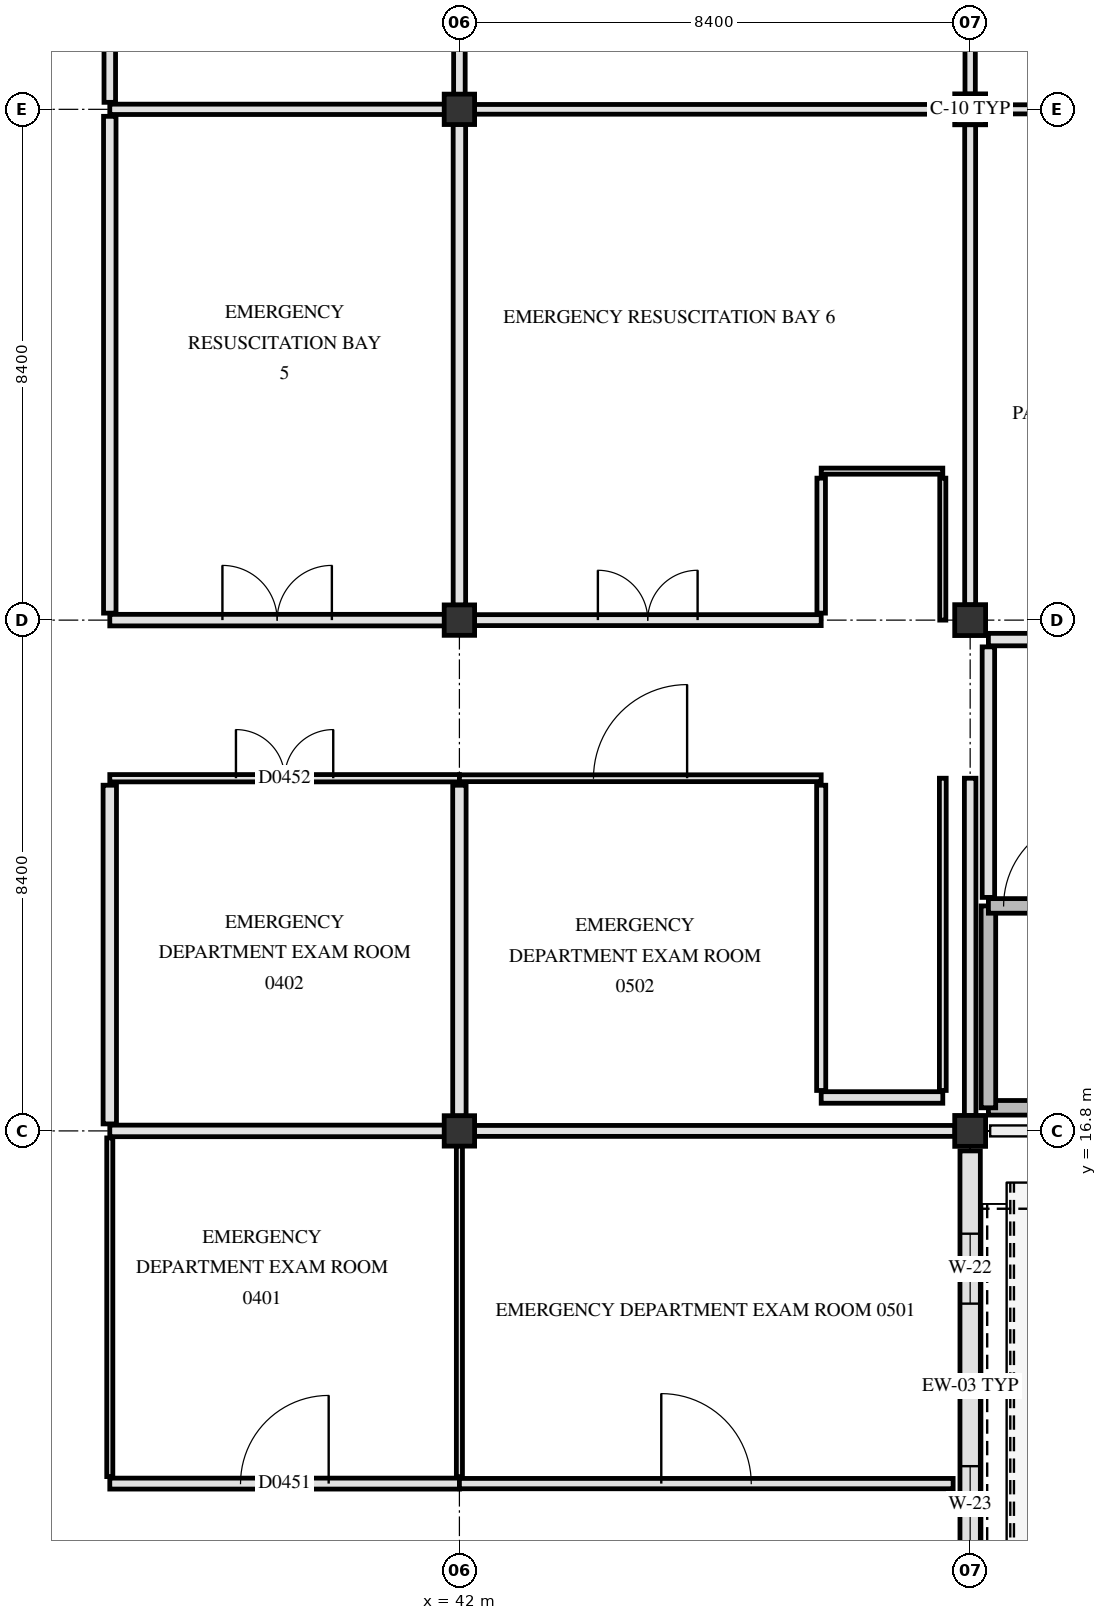
"""IFC4 building model, lengths in metres.
Left out: names, types, materials, properties, quantities, classifications, styles, units other than length and angle.
Written with IfcOpenShell. Run it as: python <this file> out.ifc"""

import sys

from ifc_helpers import new_model, si_unit, direction, frame, frame_2d, origin, origin_2d, place, context, subcontext, project, spatial, rectangle, hollow_circle, extrude, element, fill, save


model = new_model("IFC4")
c1 = context("Model", 3, precision=1e-05, world=origin(), true_north=direction((0.0, 1.0)))
c2 = subcontext(c1, "Body", "Model", "MODEL_VIEW")
j1 = project(units=[si_unit("LENGTHUNIT", "METRE"), si_unit("PLANEANGLEUNIT", "RADIAN")], contexts=[c1])
p1 = place(None, origin())
s1 = spatial("IfcSite", under=j1, at=p1, CompositionType="ELEMENT")
p2 = place(p1, origin())
s2 = spatial("IfcBuilding", under=s1, at=p2, CompositionType="ELEMENT")
p3 = place(p2, origin())
s3 = spatial("IfcBuildingStorey", under=s2, at=p3, CompositionType="ELEMENT", Elevation=0.0)
for number, where, z_axis, x_axis in (
    (1, (42.0, 16.8, 0.0), (0.0, 0.0, 1.0), (1.0, 0.0, 0.0)),
    (2, (42.0, 25.2, 0.0), (0.0, 0.0, 1.0), (1.0, 0.0, 0.0)),
    (3, (42.0, 33.6, 0.0), (0.0, 0.0, 1.0), (1.0, 0.0, 0.0)),
):
    element("IfcColumn", number, at=place(p3, frame(where, z_axis=z_axis, x_axis=x_axis)), inside=s3, PredefinedType="COLUMN", context=c2, shape_type="SweptSolid", body=[
        extrude(rectangle(XDim=0.5, YDim=0.5, at=origin_2d()), origin(), (0.0, 0.0, 1.0), 4.8),
    ])
for number, where, z_axis, x_axis in (
    (4, (50.4, 16.8, 0.0), (0.0, 0.0, 1.0), (1.0, 0.0, 0.0)),
    (5, (50.4, 25.2, 0.0), (0.0, 0.0, 1.0), (1.0, 0.0, 0.0)),
    (6, (50.4, 33.6, 0.0), (0.0, 0.0, 1.0), (1.0, 0.0, 0.0)),
):
    element("IfcColumn", number, at=place(p3, frame(where, z_axis=z_axis, x_axis=x_axis)), inside=s3, PredefinedType="COLUMN", context=c2, shape_type="SweptSolid", body=[
        extrude(hollow_circle(Radius=0.254, WallThickness=0.02, at=origin_2d()), origin(), (0.0, 0.0, 1.0), 4.8),
    ])
p4 = place(p3, frame((50.4, 16.471, 0.0), z_axis=(0.0, 0.0, 1.0), x_axis=(0.0, -1.0, 0.0)))
e7 = element("IfcWall", 7, at=p4, inside=s3, PredefinedType="SOLIDWALL", context=c2, shape_type="SweptSolid", body=[
    extrude(rectangle(XDim=7.746, YDim=0.335, at=frame_2d((3.873, 0.0))), origin(), (0.0, 0.0, 1.0), 3.79),
])
p5 = place(p4, frame((1.362, 0.0, 0.85)))
e8 = element("IfcOpeningElement", 8, at=p5, cuts=e7, PredefinedType="OPENING", context=c2, shape_type="SweptSolid", body=[
    extrude(rectangle(XDim=1.15, YDim=1.54, at=frame_2d((0.575, 0.77))), frame((0.0, 0.177, 0.0), z_axis=(0.0, -1.0, 0.0), x_axis=(1.0, 0.0, 0.0)), (0.0, 0.0, 1.0), 0.355),
])
p6 = place(p4, frame((5.185, 0.0, 0.85)))
e9 = element("IfcOpeningElement", 9, at=p6, cuts=e7, PredefinedType="OPENING", context=c2, shape_type="SweptSolid", body=[
    extrude(rectangle(XDim=1.25, YDim=1.54, at=frame_2d((0.625, 0.77))), frame((0.0, 0.177, 0.0), z_axis=(0.0, -1.0, 0.0), x_axis=(1.0, 0.0, 0.0)), (0.0, 0.0, 1.0), 0.355),
])
p7 = place(p3, frame((50.7, 17.18, 0.0), z_axis=(0.0, 0.0, 1.0), x_axis=(1.0, 0.0, 0.0)))
e10 = element("IfcWall", 10, at=p7, inside=s3, PredefinedType="SHEAR", context=c2, shape_type="SweptSolid", body=[
    extrude(rectangle(XDim=7.82, YDim=0.24, at=frame_2d((3.91, 0.0))), origin(), (0.0, 0.0, 1.0), 4.5),
])
p8 = place(p3, frame((50.7, 17.18, 0.0), z_axis=(0.0, 0.0, 1.0), x_axis=(0.0, 1.0, 0.0)))
e11 = element("IfcWall", 11, at=p8, inside=s3, PredefinedType="SHEAR", context=c2, shape_type="SweptSolid", body=[
    extrude(rectangle(XDim=3.32, YDim=0.24, at=frame_2d((1.66, 0.0))), origin(), (0.0, 0.0, 1.0), 4.5),
])
p9 = place(p3, frame((50.7, 20.5, 0.0), z_axis=(0.0, 0.0, 1.0), x_axis=(1.0, 0.0, 0.0)))
e12 = element("IfcWall", 12, at=p9, inside=s3, PredefinedType="SHEAR", context=c2, shape_type="SweptSolid", body=[
    extrude(rectangle(XDim=7.82, YDim=0.24, at=frame_2d((3.91, 0.0))), origin(), (0.0, 0.0, 1.0), 4.5),
])
p10 = place(p9, frame((0.25, 0.0, 0.0)))
e13 = element("IfcOpeningElement", 13, at=p10, cuts=e12, PredefinedType="OPENING", context=c2, shape_type="SweptSolid", body=[
    extrude(rectangle(XDim=1.45, YDim=2.2, at=frame_2d((0.725, 1.1))), frame((0.0, 0.13, 0.0), z_axis=(0.0, -1.0, 0.0), x_axis=(1.0, 0.0, 0.0)), (0.0, 0.0, 1.0), 0.26),
])
p11 = place(p3, frame((50.7, 20.64, 0.0), z_axis=(0.0, 0.0, 1.0), x_axis=(0.0, 1.0, 0.0)))
e14 = element("IfcWall", 14, at=p11, inside=s3, PredefinedType="PARTITIONING", context=c2, shape_type="SweptSolid", body=[
    extrude(rectangle(XDim=4.12, YDim=0.205, at=frame_2d((2.06, 0.0))), origin(), (0.0, 0.0, 1.0), 4.49),
])
p12 = place(p3, frame((50.7, 24.88, 0.0), z_axis=(0.0, 0.0, 1.0), x_axis=(1.0, 0.0, 0.0)))
e15 = element("IfcWall", 15, at=p12, inside=s3, PredefinedType="PARTITIONING", context=c2, shape_type="SweptSolid", body=[
    extrude(rectangle(XDim=4.18, YDim=0.205, at=frame_2d((2.09, 0.0))), origin(), (0.0, 0.0, 1.0), 3.84),
])
p13 = place(p12, frame((1.29, 0.0, 0.0)))
e16 = element("IfcOpeningElement", 16, at=p13, cuts=e15, PredefinedType="OPENING", context=c2, shape_type="SweptSolid", body=[
    extrude(rectangle(XDim=1.6, YDim=2.25, at=frame_2d((0.8, 1.125))), frame((0.0, 0.113, 0.0), z_axis=(0.0, -1.0, 0.0), x_axis=(1.0, 0.0, 0.0)), (0.0, 0.0, 1.0), 0.225),
])
p14 = place(p3, frame((36.25, 11.0, 0.0), z_axis=(0.0, 0.0, 1.0), x_axis=(1.0, 0.0, 0.0)))
e17 = element("IfcWall", 17, at=p14, inside=s3, PredefinedType="PARTITIONING", context=c2, shape_type="SweptSolid", body=[
    extrude(rectangle(XDim=5.75, YDim=0.18, at=frame_2d((2.875, 0.0))), origin(), (0.0, 0.0, 1.0), 3.89),
])
p15 = place(p14, frame((2.15, 0.0, 0.0)))
e18 = element("IfcOpeningElement", 18, at=p15, cuts=e17, PredefinedType="OPENING", context=c2, shape_type="SweptSolid", body=[
    extrude(rectangle(XDim=1.45, YDim=2.2, at=frame_2d((0.725, 1.1))), frame((0.0, 0.1, 0.0), z_axis=(0.0, -1.0, 0.0), x_axis=(1.0, 0.0, 0.0)), (0.0, 0.0, 1.0), 0.2),
])
p16 = place(p3, frame((42.0, 11.0, 0.0), z_axis=(0.0, 0.0, 1.0), x_axis=(1.0, 0.0, 0.0)))
e19 = element("IfcWall", 19, at=p16, inside=s3, PredefinedType="PARTITIONING", context=c2, shape_type="SweptSolid", body=[
    extrude(rectangle(XDim=8.12, YDim=0.17, at=frame_2d((4.06, 0.0))), origin(), (0.0, 0.0, 1.0), 3.89),
])
p17 = place(p16, frame((3.32, 0.0, 0.0)))
e20 = element("IfcOpeningElement", 20, at=p17, cuts=e19, PredefinedType="OPENING", context=c2, shape_type="SweptSolid", body=[
    extrude(rectangle(XDim=1.48, YDim=2.22, at=frame_2d((0.74, 1.11))), frame((0.0, 0.095, 0.0), z_axis=(0.0, -1.0, 0.0), x_axis=(1.0, 0.0, 0.0)), (0.0, 0.0, 1.0), 0.19),
])
p18 = place(p3, frame((36.25, 16.8, 0.0), z_axis=(0.0, 0.0, 1.0), x_axis=(1.0, 0.0, 0.0)))
e21 = element("IfcWall", 21, at=p18, inside=s3, PredefinedType="PARTITIONING", context=c2, shape_type="SweptSolid", body=[
    extrude(rectangle(XDim=5.505, YDim=0.19, at=frame_2d((2.752, 0.0))), origin(), (0.0, 0.0, 1.0), 3.84),
])
p19 = place(p3, frame((42.245, 16.8, 0.0), z_axis=(0.0, 0.0, 1.0), x_axis=(1.0, 0.0, 0.0)))
e22 = element("IfcWall", 22, at=p19, inside=s3, PredefinedType="PARTITIONING", context=c2, shape_type="SweptSolid", body=[
    extrude(rectangle(XDim=7.906, YDim=0.18, at=frame_2d((3.953, 0.0))), origin(), (0.0, 0.0, 1.0), 3.84),
])
p20 = place(p3, frame((47.95, 17.35, 0.0), z_axis=(0.0, 0.0, 1.0), x_axis=(1.0, 0.0, 0.0)))
e23 = element("IfcWall", 23, at=p20, inside=s3, PredefinedType="PARTITIONING", context=c2, shape_type="SweptSolid", body=[
    extrude(rectangle(XDim=2.0, YDim=0.19, at=frame_2d((1.0, 0.0))), origin(), (0.0, 0.0, 1.0), 4.49),
])
p21 = place(p3, frame((36.25, 22.6, 0.0), z_axis=(0.0, 0.0, 1.0), x_axis=(1.0, 0.0, 0.0)))
e24 = element("IfcWall", 24, at=p21, inside=s3, PredefinedType="PARTITIONING", context=c2, shape_type="SweptSolid", body=[
    extrude(rectangle(XDim=5.75, YDim=0.12, at=frame_2d((2.875, 0.0))), origin(), (0.0, 0.0, 1.0), 3.89),
])
p22 = place(p21, frame((2.075, 0.0, 0.0)))
e25 = element("IfcOpeningElement", 25, at=p22, cuts=e24, PredefinedType="OPENING", context=c2, shape_type="SweptSolid", body=[
    extrude(rectangle(XDim=1.6, YDim=2.25, at=frame_2d((0.8, 1.125))), frame((0.0, 0.07, 0.0), z_axis=(0.0, -1.0, 0.0), x_axis=(1.0, 0.0, 0.0)), (0.0, 0.0, 1.0), 0.14),
])
p23 = place(p3, frame((42.0, 22.6, 0.0), z_axis=(0.0, 0.0, 1.0), x_axis=(1.0, 0.0, 0.0)))
e26 = element("IfcWall", 26, at=p23, inside=s3, PredefinedType="PARTITIONING", context=c2, shape_type="SweptSolid", body=[
    extrude(rectangle(XDim=5.95, YDim=0.112, at=frame_2d((2.975, 0.0))), origin(), (0.0, 0.0, 1.0), 3.89),
])
p24 = place(p23, frame((2.205, 0.0, 0.0)))
e27 = element("IfcOpeningElement", 27, at=p24, cuts=e26, PredefinedType="OPENING", context=c2, shape_type="SweptSolid", body=[
    extrude(rectangle(XDim=1.54, YDim=2.24, at=frame_2d((0.77, 1.12))), frame((0.0, 0.066, 0.0), z_axis=(0.0, -1.0, 0.0), x_axis=(1.0, 0.0, 0.0)), (0.0, 0.0, 1.0), 0.132),
])
p25 = place(p3, frame((36.25, 25.2, 0.0), z_axis=(0.0, 0.0, 1.0), x_axis=(1.0, 0.0, 0.0)))
e28 = element("IfcWall", 28, at=p25, inside=s3, PredefinedType="PARTITIONING", context=c2, shape_type="SweptSolid", body=[
    extrude(rectangle(XDim=5.505, YDim=0.19, at=frame_2d((2.752, 0.0))), origin(), (0.0, 0.0, 1.0), 3.84),
])
p26 = place(p25, frame((1.853, 0.0, 0.0)))
e29 = element("IfcOpeningElement", 29, at=p26, cuts=e28, PredefinedType="OPENING", context=c2, shape_type="SweptSolid", body=[
    extrude(rectangle(XDim=1.8, YDim=2.25, at=frame_2d((0.9, 1.125))), frame((0.0, 0.105, 0.0), z_axis=(0.0, -1.0, 0.0), x_axis=(1.0, 0.0, 0.0)), (0.0, 0.0, 1.0), 0.21),
])
p27 = place(p3, frame((42.245, 25.2, 0.0), z_axis=(0.0, 0.0, 1.0), x_axis=(1.0, 0.0, 0.0)))
e30 = element("IfcWall", 30, at=p27, inside=s3, PredefinedType="PARTITIONING", context=c2, shape_type="SweptSolid", body=[
    extrude(rectangle(XDim=5.705, YDim=0.18, at=frame_2d((2.853, 0.0))), origin(), (0.0, 0.0, 1.0), 3.84),
])
p28 = place(p27, frame((2.032, 0.0, 0.0)))
e31 = element("IfcOpeningElement", 31, at=p28, cuts=e30, PredefinedType="OPENING", context=c2, shape_type="SweptSolid", body=[
    extrude(rectangle(XDim=1.64, YDim=2.28, at=frame_2d((0.82, 1.14))), frame((0.0, 0.1, 0.0), z_axis=(0.0, -1.0, 0.0), x_axis=(1.0, 0.0, 0.0)), (0.0, 0.0, 1.0), 0.2),
])
p29 = place(p3, frame((47.95, 27.65, 0.0), z_axis=(0.0, 0.0, 1.0), x_axis=(1.0, 0.0, 0.0)))
e32 = element("IfcWall", 32, at=p29, inside=s3, PredefinedType="PARTITIONING", context=c2, shape_type="SweptSolid", body=[
    extrude(rectangle(XDim=2.0, YDim=0.1, at=frame_2d((1.0, 0.0))), origin(), (0.0, 0.0, 1.0), 4.49),
])
p30 = place(p3, frame((36.25, 33.6, 0.0), z_axis=(0.0, 0.0, 1.0), x_axis=(1.0, 0.0, 0.0)))
e33 = element("IfcWall", 33, at=p30, inside=s3, PredefinedType="PARTITIONING", context=c2, shape_type="SweptSolid", body=[
    extrude(rectangle(XDim=5.505, YDim=0.17, at=frame_2d((2.752, 0.0))), origin(), (0.0, 0.0, 1.0), 3.84),
])
p31 = place(p3, frame((42.245, 33.6, 0.0), z_axis=(0.0, 0.0, 1.0), x_axis=(1.0, 0.0, 0.0)))
e34 = element("IfcWall", 34, at=p31, inside=s3, PredefinedType="PARTITIONING", context=c2, shape_type="SweptSolid", body=[
    extrude(rectangle(XDim=7.906, YDim=0.16, at=frame_2d((3.953, 0.0))), origin(), (0.0, 0.0, 1.0), 3.84),
])
p32 = place(p3, frame((50.649, 33.6, 0.0), z_axis=(0.0, 0.0, 1.0), x_axis=(1.0, 0.0, 0.0)))
e35 = element("IfcWall", 35, at=p32, inside=s3, PredefinedType="PARTITIONING", context=c2, shape_type="SweptSolid", body=[
    extrude(rectangle(XDim=7.856, YDim=0.15, at=frame_2d((3.928, 0.0))), origin(), (0.0, 0.0, 1.0), 3.84),
])
p33 = place(p3, frame((36.25, 11.115, 0.0), z_axis=(0.0, 0.0, 1.0), x_axis=(0.0, 1.0, 0.0)))
e36 = element("IfcWall", 36, at=p33, inside=s3, PredefinedType="PARTITIONING", context=c2, shape_type="SweptSolid", body=[
    extrude(rectangle(XDim=5.57, YDim=0.1, at=frame_2d((2.785, 0.0))), origin(), (0.0, 0.0, 1.0), 3.84),
])
p34 = place(p3, frame((36.25, 16.915, 0.0), z_axis=(0.0, 0.0, 1.0), x_axis=(0.0, 1.0, 0.0)))
e37 = element("IfcWall", 37, at=p34, inside=s3, PredefinedType="PARTITIONING", context=c2, shape_type="SweptSolid", body=[
    extrude(rectangle(XDim=5.57, YDim=0.22, at=frame_2d((2.785, 0.0))), origin(), (0.0, 0.0, 1.0), 3.84),
])
p35 = place(p3, frame((36.25, 25.315, 0.0), z_axis=(0.0, 0.0, 1.0), x_axis=(0.0, 1.0, 0.0)))
e38 = element("IfcWall", 38, at=p35, inside=s3, PredefinedType="PARTITIONING", context=c2, shape_type="SweptSolid", body=[
    extrude(rectangle(XDim=8.17, YDim=0.205, at=frame_2d((4.085, 0.0))), origin(), (0.0, 0.0, 1.0), 3.84),
])
p36 = place(p3, frame((36.25, 33.715, 0.0), z_axis=(0.0, 0.0, 1.0), x_axis=(0.0, 1.0, 0.0)))
e39 = element("IfcWall", 39, at=p36, inside=s3, PredefinedType="PARTITIONING", context=c2, shape_type="SweptSolid", body=[
    extrude(rectangle(XDim=8.17, YDim=0.19, at=frame_2d((4.085, 0.0))), origin(), (0.0, 0.0, 1.0), 3.84),
])
p37 = place(p3, frame((42.0, 11.115, 0.0), z_axis=(0.0, 0.0, 1.0), x_axis=(0.0, 1.0, 0.0)))
e40 = element("IfcWall", 40, at=p37, inside=s3, PredefinedType="PARTITIONING", context=c2, shape_type="SweptSolid", body=[
    extrude(rectangle(XDim=5.44, YDim=0.1, at=frame_2d((2.72, 0.0))), origin(), (0.0, 0.0, 1.0), 3.89),
])
p38 = place(p3, frame((42.0, 17.045, 0.0), z_axis=(0.0, 0.0, 1.0), x_axis=(0.0, 1.0, 0.0)))
e41 = element("IfcWall", 41, at=p38, inside=s3, PredefinedType="PARTITIONING", context=c2, shape_type="SweptSolid", body=[
    extrude(rectangle(XDim=5.44, YDim=0.22, at=frame_2d((2.72, 0.0))), origin(), (0.0, 0.0, 1.0), 3.89),
])
p39 = place(p3, frame((42.0, 25.445, 0.0), z_axis=(0.0, 0.0, 1.0), x_axis=(0.0, 1.0, 0.0)))
e42 = element("IfcWall", 42, at=p39, inside=s3, PredefinedType="PARTITIONING", context=c2, shape_type="SweptSolid", body=[
    extrude(rectangle(XDim=7.91, YDim=0.205, at=frame_2d((3.955, 0.0))), origin(), (0.0, 0.0, 1.0), 3.89),
])
p40 = place(p3, frame((42.0, 33.845, 0.0), z_axis=(0.0, 0.0, 1.0), x_axis=(0.0, 1.0, 0.0)))
e43 = element("IfcWall", 43, at=p40, inside=s3, PredefinedType="PARTITIONING", context=c2, shape_type="SweptSolid", body=[
    extrude(rectangle(XDim=7.91, YDim=0.19, at=frame_2d((3.955, 0.0))), origin(), (0.0, 0.0, 1.0), 3.89),
])
p41 = place(p3, frame((47.95, 17.465, 0.0), z_axis=(0.0, 0.0, 1.0), x_axis=(0.0, 1.0, 0.0)))
e44 = element("IfcWall", 44, at=p41, inside=s3, PredefinedType="PARTITIONING", context=c2, shape_type="SweptSolid", body=[
    extrude(rectangle(XDim=5.02, YDim=0.15, at=frame_2d((2.51, 0.0))), origin(), (0.0, 0.0, 1.0), 4.49),
])
p42 = place(p3, frame((47.95, 25.315, 0.0), z_axis=(0.0, 0.0, 1.0), x_axis=(0.0, 1.0, 0.0)))
e45 = element("IfcWall", 45, at=p42, inside=s3, PredefinedType="PARTITIONING", context=c2, shape_type="SweptSolid", body=[
    extrude(rectangle(XDim=2.22, YDim=0.14, at=frame_2d((1.11, 0.0))), origin(), (0.0, 0.0, 1.0), 3.84),
])
p43 = place(p3, frame((49.95, 17.465, 0.0), z_axis=(0.0, 0.0, 1.0), x_axis=(0.0, 1.0, 0.0)))
e46 = element("IfcWall", 46, at=p43, inside=s3, PredefinedType="PARTITIONING", context=c2, shape_type="SweptSolid", body=[
    extrude(rectangle(XDim=5.135, YDim=0.112, at=frame_2d((2.567, 0.0))), origin(), (0.0, 0.0, 1.0), 4.49),
])
p44 = place(p3, frame((49.95, 25.2, 0.0), z_axis=(0.0, 0.0, 1.0), x_axis=(0.0, 1.0, 0.0)))
e47 = element("IfcWall", 47, at=p44, inside=s3, PredefinedType="PARTITIONING", context=c2, shape_type="SweptSolid", body=[
    extrude(rectangle(XDim=2.335, YDim=0.1, at=frame_2d((1.167, 0.0))), origin(), (0.0, 0.0, 1.0), 3.84),
])
p45 = place(p3, frame((50.4, 17.049, 0.0), z_axis=(0.0, 0.0, 1.0), x_axis=(0.0, 1.0, 0.0)))
e48 = element("IfcWall", 48, at=p45, inside=s3, PredefinedType="PARTITIONING", context=c2, shape_type="SweptSolid", body=[
    extrude(rectangle(XDim=5.551, YDim=0.19, at=frame_2d((2.775, 0.0))), origin(), (0.0, 0.0, 1.0), 4.09),
])
p46 = place(p3, frame((50.4, 25.449, 0.0), z_axis=(0.0, 0.0, 1.0), x_axis=(0.0, 1.0, 0.0)))
e49 = element("IfcWall", 49, at=p46, inside=s3, PredefinedType="PARTITIONING", context=c2, shape_type="SweptSolid", body=[
    extrude(rectangle(XDim=7.902, YDim=0.18, at=frame_2d((3.951, 0.0))), origin(), (0.0, 0.0, 1.0), 4.09),
])
p47 = place(p3, frame((50.4, 33.849, 0.0), z_axis=(0.0, 0.0, 1.0), x_axis=(0.0, 1.0, 0.0)))
e50 = element("IfcWall", 50, at=p47, inside=s3, PredefinedType="PARTITIONING", context=c2, shape_type="SweptSolid", body=[
    extrude(rectangle(XDim=7.902, YDim=0.17, at=frame_2d((3.951, 0.0))), origin(), (0.0, 0.0, 1.0), 4.09),
])
p48 = place(p5, origin())
e51 = element("IfcWindow", 51, at=p48, inside=s3, PartitioningType="SINGLE_PANEL", PredefinedType="WINDOW", context=c2, shape_type="SweptSolid", body=[
    extrude(rectangle(XDim=1.15, YDim=1.54, at=frame_2d((0.575, 0.77))), frame((0.0, 0.03, 0.0), z_axis=(0.0, -1.0, 0.0), x_axis=(1.0, 0.0, 0.0)), (0.0, 0.0, 1.0), 0.06),
])
fill(e8, e51)
p49 = place(p6, origin())
e52 = element("IfcWindow", 52, at=p49, inside=s3, PartitioningType="SINGLE_PANEL", PredefinedType="WINDOW", context=c2, shape_type="SweptSolid", body=[
    extrude(rectangle(XDim=1.25, YDim=1.54, at=frame_2d((0.625, 0.77))), frame((0.0, 0.03, 0.0), z_axis=(0.0, -1.0, 0.0), x_axis=(1.0, 0.0, 0.0)), (0.0, 0.0, 1.0), 0.06),
])
fill(e9, e52)
p50 = place(p10, origin())
e53 = element("IfcDoor", 53, at=p50, inside=s3, OperationType="SINGLE_SWING_RIGHT", PredefinedType="DOOR", context=c2, shape_type="SweptSolid", body=[
    extrude(rectangle(XDim=1.45, YDim=2.2, at=frame_2d((0.725, 1.1))), frame((0.0, 0.025, 0.0), z_axis=(0.0, -1.0, 0.0), x_axis=(1.0, 0.0, 0.0)), (0.0, 0.0, 1.0), 0.05),
])
fill(e13, e53)
p51 = place(p15, origin())
e54 = element("IfcDoor", 54, at=p51, inside=s3, OperationType="SINGLE_SWING_RIGHT", PredefinedType="DOOR", context=c2, shape_type="SweptSolid", body=[
    extrude(rectangle(XDim=1.45, YDim=2.2, at=frame_2d((0.725, 1.1))), frame((0.0, 0.025, 0.0), z_axis=(0.0, -1.0, 0.0), x_axis=(1.0, 0.0, 0.0)), (0.0, 0.0, 1.0), 0.05),
])
fill(e18, e54)
p52 = place(p22, origin())
e55 = element("IfcDoor", 55, at=p52, inside=s3, OperationType="DOUBLE_SWING_LEFT", PredefinedType="DOOR", context=c2, shape_type="SweptSolid", body=[
    extrude(rectangle(XDim=1.6, YDim=2.25, at=frame_2d((0.8, 1.125))), frame((0.0, 0.025, 0.0), z_axis=(0.0, -1.0, 0.0), x_axis=(1.0, 0.0, 0.0)), (0.0, 0.0, 1.0), 0.05),
])
fill(e25, e55)
p53 = place(p26, origin())
e56 = element("IfcDoor", 56, at=p53, inside=s3, OperationType="DOUBLE_SWING_RIGHT", PredefinedType="DOOR", context=c2, shape_type="SweptSolid", body=[
    extrude(rectangle(XDim=1.8, YDim=2.25, at=frame_2d((0.9, 1.125))), frame((0.0, 0.025, 0.0), z_axis=(0.0, -1.0, 0.0), x_axis=(1.0, 0.0, 0.0)), (0.0, 0.0, 1.0), 0.05),
])
fill(e29, e56)
p54 = place(p17, origin())
e57 = element("IfcDoor", 57, at=p54, inside=s3, OperationType="SINGLE_SWING_LEFT", PredefinedType="DOOR", context=c2, shape_type="SweptSolid", body=[
    extrude(rectangle(XDim=1.48, YDim=2.22, at=frame_2d((0.74, 1.11))), frame((0.0, 0.025, 0.0), z_axis=(0.0, -1.0, 0.0), x_axis=(1.0, 0.0, 0.0)), (0.0, 0.0, 1.0), 0.05),
])
fill(e20, e57)
p55 = place(p24, origin())
e58 = element("IfcDoor", 58, at=p55, inside=s3, OperationType="SINGLE_SWING_RIGHT", PredefinedType="DOOR", context=c2, shape_type="SweptSolid", body=[
    extrude(rectangle(XDim=1.54, YDim=2.24, at=frame_2d((0.77, 1.12))), frame((0.0, 0.025, 0.0), z_axis=(0.0, -1.0, 0.0), x_axis=(1.0, 0.0, 0.0)), (0.0, 0.0, 1.0), 0.05),
])
fill(e27, e58)
p56 = place(p28, origin())
e59 = element("IfcDoor", 59, at=p56, inside=s3, OperationType="DOUBLE_SWING_LEFT", PredefinedType="DOOR", context=c2, shape_type="SweptSolid", body=[
    extrude(rectangle(XDim=1.64, YDim=2.28, at=frame_2d((0.82, 1.14))), frame((0.0, 0.025, 0.0), z_axis=(0.0, -1.0, 0.0), x_axis=(1.0, 0.0, 0.0)), (0.0, 0.0, 1.0), 0.05),
])
fill(e31, e59)
save(model, sys.argv[1])
